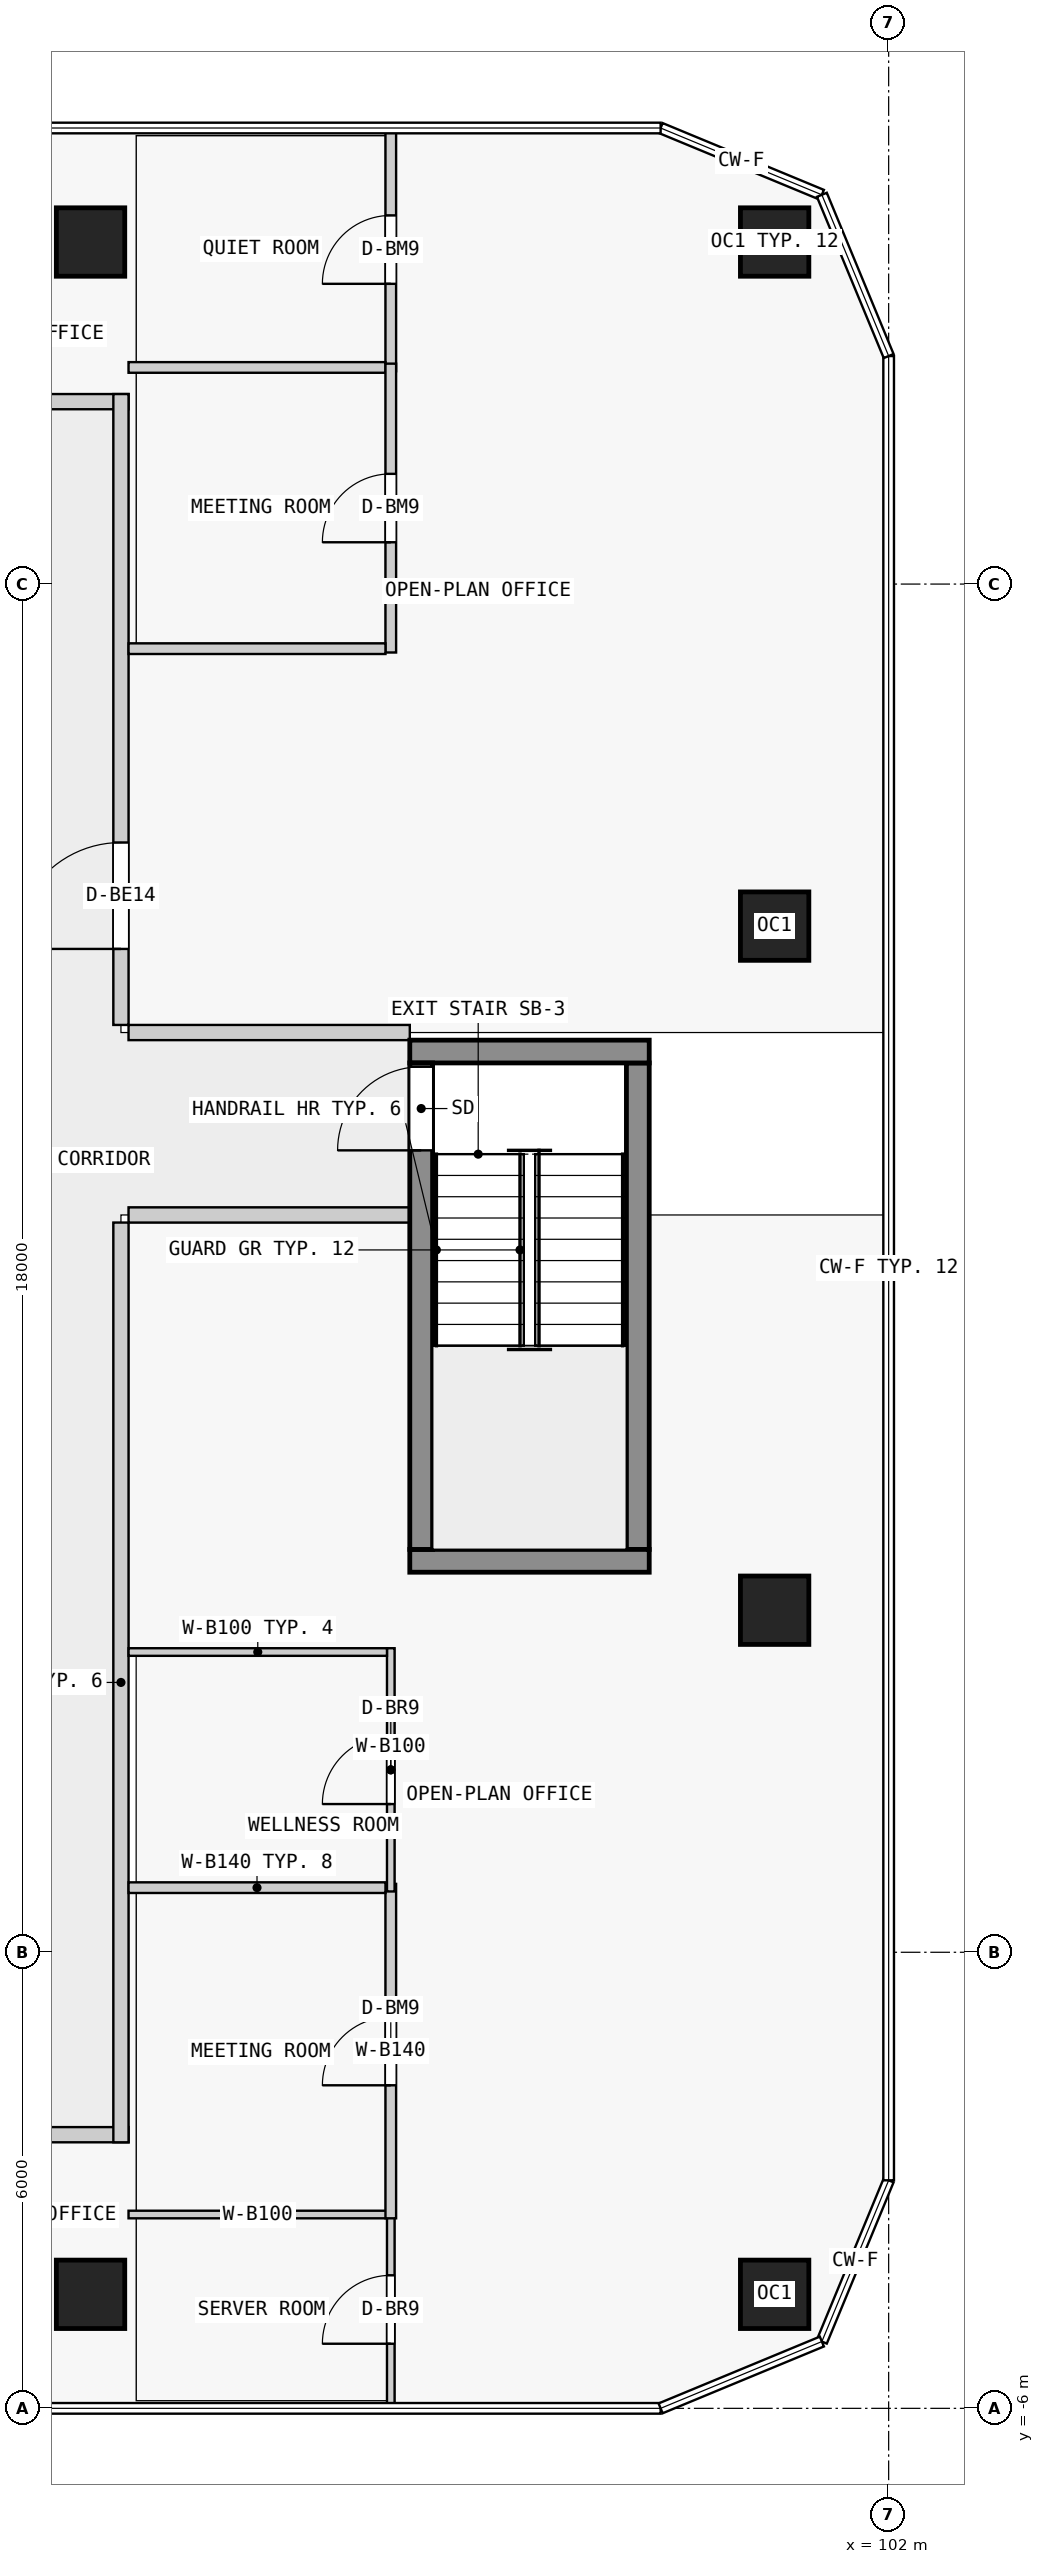
"""IFC4 building model, lengths in metres.
Left out: names, types, materials, properties, quantities, classifications, styles, units other than length and angle.
Written with IfcOpenShell. Run it as: python <this file> out.ifc"""

import sys

from ifc_helpers import new_model, si_unit, direction, frame, frame_2d, origin, origin_2d, place, context, subcontext, project, spatial, rectangle, extrude, element, fill, save


model = new_model("IFC4")
c1 = context("Model", 3, precision=1e-05, world=origin(), true_north=direction((0.0, 1.0)))
c2 = subcontext(c1, "Body", "Model", "MODEL_VIEW")
j1 = project(units=[si_unit("LENGTHUNIT", "METRE"), si_unit("PLANEANGLEUNIT", "RADIAN")], contexts=[c1])
p1 = place(None, origin())
s1 = spatial("IfcSite", under=j1, at=p1, CompositionType="ELEMENT")
p2 = place(p1, origin())
s2 = spatial("IfcBuilding", under=s1, at=p2, CompositionType="ELEMENT")
p3 = place(p2, frame((0.0, 0.0, 37.3)))
s3 = spatial("IfcBuildingStorey", under=s2, at=p3, CompositionType="ELEMENT", Elevation=37.3)
for number, where, z_axis, x_axis in (
    (1, (91.5, -4.5, 0.0), (0.0, 0.0, 1.0), (1.0, 0.0, 0.0)),
    (2, (100.5, -4.5, 0.0), (0.0, 0.0, 1.0), (1.0, 0.0, 0.0)),
    (3, (100.5, 4.5, 0.0), (0.0, 0.0, 1.0), (1.0, 0.0, 0.0)),
    (4, (100.5, 13.5, 0.0), (0.0, 0.0, 1.0), (1.0, 0.0, 0.0)),
    (5, (100.5, 22.5, 0.0), (0.0, 0.0, 1.0), (1.0, 0.0, 0.0)),
    (6, (91.5, 22.5, 0.0), (0.0, 0.0, 1.0), (1.0, 0.0, 0.0)),
):
    element("IfcColumn", number, at=place(p3, frame(where, z_axis=z_axis, x_axis=x_axis)), inside=s3, PredefinedType="COLUMN", context=c2, shape_type="SweptSolid", body=[
        extrude(rectangle(XDim=0.9, YDim=0.9, at=origin_2d()), origin(), (0.0, 0.0, 1.0), 3.5),
    ])
p4 = place(p3, frame((95.85, 5.3, 0.0), z_axis=(0.0, 0.0, 1.0), x_axis=(0.0, 1.0, 0.0)))
e7 = element("IfcWall", 7, at=p4, inside=s3, PredefinedType="SHEAR", context=c2, shape_type="SweptSolid", body=[
    extrude(rectangle(XDim=6.4, YDim=0.3, at=frame_2d((3.2, 0.0))), origin(), (0.0, 0.0, 1.0), 3.25),
])
p5 = place(p4, frame((5.25, 0.0, 0.0)))
e8 = element("IfcOpeningElement", 8, at=p5, cuts=e7, PredefinedType="OPENING", context=c2, shape_type="SweptSolid", body=[
    extrude(rectangle(XDim=1.1, YDim=2.1, at=frame_2d((0.55, 1.05))), frame((0.0, 0.16, 0.0), z_axis=(0.0, -1.0, 0.0), x_axis=(1.0, 0.0, 0.0)), (0.0, 0.0, 1.0), 0.32),
])
p6 = place(p3, frame((98.7, 5.3, 0.0), z_axis=(0.0, 0.0, 1.0), x_axis=(0.0, 1.0, 0.0)))
e9 = element("IfcWall", 9, at=p6, inside=s3, PredefinedType="SHEAR", context=c2, shape_type="SweptSolid", body=[
    extrude(rectangle(XDim=6.4, YDim=0.3, at=frame_2d((3.2, 0.0))), origin(), (0.0, 0.0, 1.0), 3.25),
])
for number, where, z_axis, x_axis in (
    (10, (95.7, 5.15, 0.0), (0.0, 0.0, 1.0), (1.0, 0.0, 0.0)),
    (11, (95.7, 11.85, 0.0), (0.0, 0.0, 1.0), (1.0, 0.0, 0.0)),
):
    element("IfcWall", number, at=place(p3, frame(where, z_axis=z_axis, x_axis=x_axis)), inside=s3, PredefinedType="SHEAR", context=c2, shape_type="SweptSolid", body=[
        extrude(rectangle(XDim=3.15, YDim=0.3, at=frame_2d((1.575, 0.0))), origin(), (0.0, 0.0, 1.0), 3.25),
    ])
p7 = place(p3, frame((72.0, -2.4, 0.0), z_axis=(0.0, 0.0, 1.0), x_axis=(1.0, 0.0, 0.0)))
e12 = element("IfcWall", 12, at=p7, inside=s3, PredefinedType="PARTITIONING", context=c2, shape_type="SweptSolid", body=[
    extrude(rectangle(XDim=20.0, YDim=0.2, at=frame_2d((10.0, 0.0))), origin(), (0.0, 0.0, 1.0), 3.25),
])
p8 = place(p7, frame((11.1, 0.0, 0.0)))
e13 = element("IfcOpeningElement", 13, at=p8, cuts=e12, PredefinedType="OPENING", context=c2, shape_type="SweptSolid", body=[
    extrude(rectangle(XDim=1.8, YDim=2.1, at=frame_2d((0.9, 1.05))), frame((0.0, 0.11, 0.0), z_axis=(0.0, -1.0, 0.0), x_axis=(1.0, 0.0, 0.0)), (0.0, 0.0, 1.0), 0.22),
])
p9 = place(p3, frame((72.0, 20.4, 0.0), z_axis=(0.0, 0.0, 1.0), x_axis=(1.0, 0.0, 0.0)))
e14 = element("IfcWall", 14, at=p9, inside=s3, PredefinedType="PARTITIONING", context=c2, shape_type="SweptSolid", body=[
    extrude(rectangle(XDim=20.0, YDim=0.2, at=frame_2d((10.0, 0.0))), origin(), (0.0, 0.0, 1.0), 3.25),
])
p10 = place(p3, frame((91.9, -2.5, 0.0), z_axis=(0.0, 0.0, 1.0), x_axis=(0.0, 1.0, 0.0)))
e15 = element("IfcWall", 15, at=p10, inside=s3, PredefinedType="PARTITIONING", context=c2, shape_type="SweptSolid", body=[
    extrude(rectangle(XDim=12.1, YDim=0.2, at=frame_2d((6.05, 0.0))), origin(), (0.0, 0.0, 1.0), 3.25),
])
p11 = place(p3, frame((91.9, 12.2, 0.0), z_axis=(0.0, 0.0, 1.0), x_axis=(0.0, 1.0, 0.0)))
e16 = element("IfcWall", 16, at=p11, inside=s3, PredefinedType="PARTITIONING", context=c2, shape_type="SweptSolid", body=[
    extrude(rectangle(XDim=8.3, YDim=0.2, at=frame_2d((4.15, 0.0))), origin(), (0.0, 0.0, 1.0), 3.25),
])
p12 = place(p11, frame((1.0, 0.0, 0.0)))
e17 = element("IfcOpeningElement", 17, at=p12, cuts=e16, PredefinedType="OPENING", context=c2, shape_type="SweptSolid", body=[
    extrude(rectangle(XDim=1.4, YDim=2.4, at=frame_2d((0.7, 1.2))), frame((0.0, 0.11, 0.0), z_axis=(0.0, -1.0, 0.0), x_axis=(1.0, 0.0, 0.0)), (0.0, 0.0, 1.0), 0.22),
])
for number, where, z_axis, x_axis in (
    (18, (92.0, 9.7, 0.0), (0.0, 0.0, 1.0), (1.0, 0.0, 0.0)),
    (19, (92.0, 12.1, 0.0), (0.0, 0.0, 1.0), (1.0, 0.0, 0.0)),
):
    element("IfcWall", number, at=place(p3, frame(where, z_axis=z_axis, x_axis=x_axis)), inside=s3, PredefinedType="PARTITIONING", context=c2, shape_type="SweptSolid", body=[
        extrude(rectangle(XDim=3.7, YDim=0.2, at=frame_2d((1.85, 0.0))), origin(), (0.0, 0.0, 1.0), 3.25),
    ])
p13 = place(p3, frame((95.45, -6.0, 0.0), z_axis=(0.0, 0.0, 1.0), x_axis=(0.0, 1.0, 0.0)))
e20 = element("IfcWall", 20, at=p13, inside=s3, PredefinedType="PARTITIONING", context=c2, shape_type="SweptSolid", body=[
    extrude(rectangle(XDim=2.6, YDim=0.1, at=frame_2d((1.3, 0.0))), origin(), (0.0, 0.0, 1.0), 3.25),
])
p14 = place(p13, frame((0.85, 0.0, 0.0)))
e21 = element("IfcOpeningElement", 21, at=p14, cuts=e20, PredefinedType="OPENING", context=c2, shape_type="SweptSolid", body=[
    extrude(rectangle(XDim=0.9, YDim=2.1, at=frame_2d((0.45, 1.05))), frame((0.0, 0.06, 0.0), z_axis=(0.0, -1.0, 0.0), x_axis=(1.0, 0.0, 0.0)), (0.0, 0.0, 1.0), 0.12),
])
p15 = place(p3, frame((92.0, -3.45, 0.0), z_axis=(0.0, 0.0, 1.0), x_axis=(1.0, 0.0, 0.0)))
e22 = element("IfcWall", 22, at=p15, inside=s3, PredefinedType="PARTITIONING", context=c2, shape_type="SweptSolid", body=[
    extrude(rectangle(XDim=3.4, YDim=0.1, at=frame_2d((1.7, 0.0))), origin(), (0.0, 0.0, 1.0), 3.25),
])
p16 = place(p3, frame((95.45, -3.5, 0.0), z_axis=(0.0, 0.0, 1.0), x_axis=(0.0, 1.0, 0.0)))
e23 = element("IfcWall", 23, at=p16, inside=s3, PredefinedType="PARTITIONING", context=c2, shape_type="SweptSolid", body=[
    extrude(rectangle(XDim=4.4, YDim=0.14, at=frame_2d((2.2, 0.0))), origin(), (0.0, 0.0, 1.0), 3.25),
])
p17 = place(p16, frame((1.75, 0.0, 0.0)))
e24 = element("IfcOpeningElement", 24, at=p17, cuts=e23, PredefinedType="OPENING", context=c2, shape_type="SweptSolid", body=[
    extrude(rectangle(XDim=0.9, YDim=2.4, at=frame_2d((0.45, 1.2))), frame((0.0, 0.08, 0.0), z_axis=(0.0, -1.0, 0.0), x_axis=(1.0, 0.0, 0.0)), (0.0, 0.0, 1.0), 0.16),
])
p18 = place(p3, frame((92.0, 0.85, 0.0), z_axis=(0.0, 0.0, 1.0), x_axis=(1.0, 0.0, 0.0)))
e25 = element("IfcWall", 25, at=p18, inside=s3, PredefinedType="PARTITIONING", context=c2, shape_type="SweptSolid", body=[
    extrude(rectangle(XDim=3.38, YDim=0.14, at=frame_2d((1.69, 0.0))), origin(), (0.0, 0.0, 1.0), 3.25),
])
p19 = place(p3, frame((95.45, 0.8, 0.0), z_axis=(0.0, 0.0, 1.0), x_axis=(0.0, 1.0, 0.0)))
e26 = element("IfcWall", 26, at=p19, inside=s3, PredefinedType="PARTITIONING", context=c2, shape_type="SweptSolid", body=[
    extrude(rectangle(XDim=3.2, YDim=0.1, at=frame_2d((1.6, 0.0))), origin(), (0.0, 0.0, 1.0), 3.25),
])
p20 = place(p19, frame((1.15, 0.0, 0.0)))
e27 = element("IfcOpeningElement", 27, at=p20, cuts=e26, PredefinedType="OPENING", context=c2, shape_type="SweptSolid", body=[
    extrude(rectangle(XDim=0.9, YDim=2.1, at=frame_2d((0.45, 1.05))), frame((0.0, 0.06, 0.0), z_axis=(0.0, -1.0, 0.0), x_axis=(1.0, 0.0, 0.0)), (0.0, 0.0, 1.0), 0.12),
])
p21 = place(p3, frame((92.0, 3.95, 0.0), z_axis=(0.0, 0.0, 1.0), x_axis=(1.0, 0.0, 0.0)))
e28 = element("IfcWall", 28, at=p21, inside=s3, PredefinedType="PARTITIONING", context=c2, shape_type="SweptSolid", body=[
    extrude(rectangle(XDim=3.4, YDim=0.1, at=frame_2d((1.7, 0.0))), origin(), (0.0, 0.0, 1.0), 3.25),
])
p22 = place(p3, frame((95.45, 20.8, 0.0), z_axis=(0.0, 0.0, 1.0), x_axis=(0.0, 1.0, 0.0)))
e29 = element("IfcWall", 29, at=p22, inside=s3, PredefinedType="PARTITIONING", context=c2, shape_type="SweptSolid", body=[
    extrude(rectangle(XDim=3.2, YDim=0.14, at=frame_2d((1.6, 0.0))), origin(), (0.0, 0.0, 1.0), 3.25),
])
p23 = place(p22, frame((1.15, 0.0, 0.0)))
e30 = element("IfcOpeningElement", 30, at=p23, cuts=e29, PredefinedType="OPENING", context=c2, shape_type="SweptSolid", body=[
    extrude(rectangle(XDim=0.9, YDim=2.4, at=frame_2d((0.45, 1.2))), frame((0.0, 0.08, 0.0), z_axis=(0.0, -1.0, 0.0), x_axis=(1.0, 0.0, 0.0)), (0.0, 0.0, 1.0), 0.16),
])
p24 = place(p3, frame((92.0, 20.85, 0.0), z_axis=(0.0, 0.0, 1.0), x_axis=(1.0, 0.0, 0.0)))
e31 = element("IfcWall", 31, at=p24, inside=s3, PredefinedType="PARTITIONING", context=c2, shape_type="SweptSolid", body=[
    extrude(rectangle(XDim=3.38, YDim=0.14, at=frame_2d((1.69, 0.0))), origin(), (0.0, 0.0, 1.0), 3.25),
])
p25 = place(p3, frame((95.45, 17.1, 0.0), z_axis=(0.0, 0.0, 1.0), x_axis=(0.0, 1.0, 0.0)))
e32 = element("IfcWall", 32, at=p25, inside=s3, PredefinedType="PARTITIONING", context=c2, shape_type="SweptSolid", body=[
    extrude(rectangle(XDim=3.8, YDim=0.14, at=frame_2d((1.9, 0.0))), origin(), (0.0, 0.0, 1.0), 3.25),
])
p26 = place(p25, frame((1.45, 0.0, 0.0)))
e33 = element("IfcOpeningElement", 33, at=p26, cuts=e32, PredefinedType="OPENING", context=c2, shape_type="SweptSolid", body=[
    extrude(rectangle(XDim=0.9, YDim=2.4, at=frame_2d((0.45, 1.2))), frame((0.0, 0.08, 0.0), z_axis=(0.0, -1.0, 0.0), x_axis=(1.0, 0.0, 0.0)), (0.0, 0.0, 1.0), 0.16),
])
p27 = place(p3, frame((92.0, 17.15, 0.0), z_axis=(0.0, 0.0, 1.0), x_axis=(1.0, 0.0, 0.0)))
e34 = element("IfcWall", 34, at=p27, inside=s3, PredefinedType="PARTITIONING", context=c2, shape_type="SweptSolid", body=[
    extrude(rectangle(XDim=3.38, YDim=0.14, at=frame_2d((1.69, 0.0))), origin(), (0.0, 0.0, 1.0), 3.25),
])
p28 = place(p5, origin())
e35 = element("IfcDoor", 35, at=p28, inside=s3, OperationType="SINGLE_SWING_LEFT", PredefinedType="DOOR", context=c2, shape_type="SweptSolid", body=[
    extrude(rectangle(XDim=1.1, YDim=2.1, at=frame_2d((0.55, 1.05))), frame((0.0, 0.025, 0.0), z_axis=(0.0, -1.0, 0.0), x_axis=(1.0, 0.0, 0.0)), (0.0, 0.0, 1.0), 0.05),
])
fill(e8, e35)
p29 = place(p12, origin())
e36 = element("IfcDoor", 36, at=p29, inside=s3, OperationType="DOUBLE_DOOR_SINGLE_SWING", PredefinedType="DOOR", context=c2, shape_type="SweptSolid", body=[
    extrude(rectangle(XDim=1.4, YDim=2.4, at=frame_2d((0.7, 1.2))), frame((0.0, 0.025, 0.0), z_axis=(0.0, -1.0, 0.0), x_axis=(1.0, 0.0, 0.0)), (0.0, 0.0, 1.0), 0.05),
])
fill(e17, e36)
p30 = place(p14, origin())
e37 = element("IfcDoor", 37, at=p30, inside=s3, OperationType="SINGLE_SWING_LEFT", PredefinedType="DOOR", context=c2, shape_type="SweptSolid", body=[
    extrude(rectangle(XDim=0.9, YDim=2.1, at=frame_2d((0.45, 1.05))), frame((0.0, 0.025, 0.0), z_axis=(0.0, -1.0, 0.0), x_axis=(1.0, 0.0, 0.0)), (0.0, 0.0, 1.0), 0.05),
])
fill(e21, e37)
p31 = place(p17, origin())
e38 = element("IfcDoor", 38, at=p31, inside=s3, OperationType="SINGLE_SWING_LEFT", PredefinedType="DOOR", context=c2, shape_type="SweptSolid", body=[
    extrude(rectangle(XDim=0.9, YDim=2.4, at=frame_2d((0.45, 1.2))), frame((0.0, 0.025, 0.0), z_axis=(0.0, -1.0, 0.0), x_axis=(1.0, 0.0, 0.0)), (0.0, 0.0, 1.0), 0.05),
])
fill(e24, e38)
p32 = place(p20, origin())
e39 = element("IfcDoor", 39, at=p32, inside=s3, OperationType="SINGLE_SWING_LEFT", PredefinedType="DOOR", context=c2, shape_type="SweptSolid", body=[
    extrude(rectangle(XDim=0.9, YDim=2.1, at=frame_2d((0.45, 1.05))), frame((0.0, 0.025, 0.0), z_axis=(0.0, -1.0, 0.0), x_axis=(1.0, 0.0, 0.0)), (0.0, 0.0, 1.0), 0.05),
])
fill(e27, e39)
p33 = place(p23, origin())
e40 = element("IfcDoor", 40, at=p33, inside=s3, OperationType="SINGLE_SWING_LEFT", PredefinedType="DOOR", context=c2, shape_type="SweptSolid", body=[
    extrude(rectangle(XDim=0.9, YDim=2.4, at=frame_2d((0.45, 1.2))), frame((0.0, 0.025, 0.0), z_axis=(0.0, -1.0, 0.0), x_axis=(1.0, 0.0, 0.0)), (0.0, 0.0, 1.0), 0.05),
])
fill(e30, e40)
p34 = place(p26, origin())
e41 = element("IfcDoor", 41, at=p34, inside=s3, OperationType="SINGLE_SWING_LEFT", PredefinedType="DOOR", context=c2, shape_type="SweptSolid", body=[
    extrude(rectangle(XDim=0.9, YDim=2.4, at=frame_2d((0.45, 1.2))), frame((0.0, 0.025, 0.0), z_axis=(0.0, -1.0, 0.0), x_axis=(1.0, 0.0, 0.0)), (0.0, 0.0, 1.0), 0.05),
])
fill(e33, e41)
save(model, sys.argv[1])
